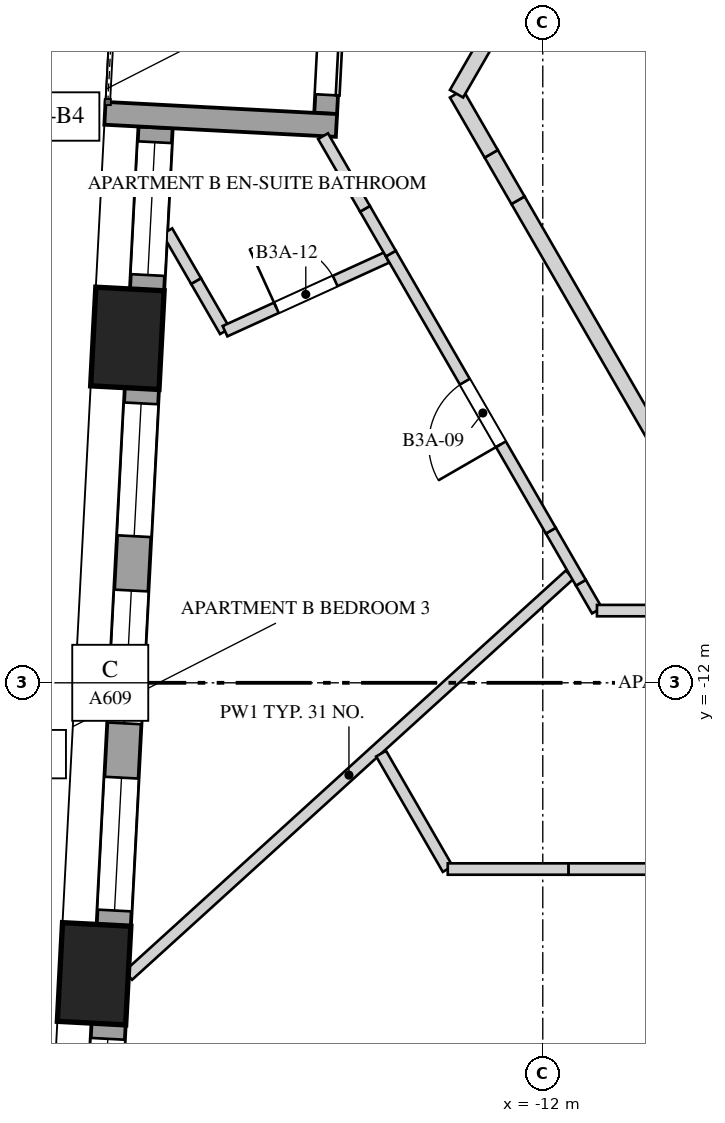
"""IFC4 building model, lengths in metres.
Left out: names, types, materials, properties, quantities, classifications, styles, units other than length and angle.
Written with IfcOpenShell. Run it as: python <this file> out.ifc"""

import sys

from ifc_helpers import new_model, si_unit, direction, frame, frame_2d, origin, origin_2d, place, context, subcontext, project, spatial, rectangle, extrude, element, fill, save


model = new_model("IFC4")
c1 = context("Model", 3, precision=1e-05, world=origin(), true_north=direction((0.0, 1.0)))
c2 = subcontext(c1, "Body", "Model", "MODEL_VIEW")
j1 = project(units=[si_unit("LENGTHUNIT", "METRE"), si_unit("PLANEANGLEUNIT", "RADIAN")], contexts=[c1])
p1 = place(None, origin())
s1 = spatial("IfcSite", under=j1, at=p1, CompositionType="ELEMENT")
p2 = place(p1, origin())
s2 = spatial("IfcBuilding", under=s1, at=p2, CompositionType="ELEMENT")
p3 = place(p2, frame((0.0, 0.0, 129.6)))
s3 = spatial("IfcBuildingStorey", under=s2, at=p3, CompositionType="ELEMENT", Elevation=129.6)
for number, where, z_axis, x_axis in (
    (1, (-17.465, -7.468, 0.0), (0.0, 0.0, 1.0), (-0.052, -0.999, 0.0)),
    (2, (-17.903, -15.828, 0.0), (0.0, 0.0, 1.0), (-0.052, -0.999, 0.0)),
):
    element("IfcColumn", number, at=place(p3, frame(where, z_axis=z_axis, x_axis=x_axis)), inside=s3, PredefinedType="COLUMN", context=c2, shape_type="SweptSolid", body=[
        extrude(rectangle(XDim=1.3, YDim=0.9, at=origin_2d()), origin(), (0.0, 0.0, 1.0), 4.0),
    ])
p4 = place(p3, frame((-17.094, -4.693, 0.0), z_axis=(0.0, 0.0, 1.0), x_axis=(-0.052355281723, -0.998628521762, 0.0)))
e3 = element("IfcWall", 3, at=p4, inside=s3, PredefinedType="SOLIDWALL", context=c2, shape_type="SweptSolid", body=[
    extrude(rectangle(XDim=2.14, YDim=0.45, at=frame_2d((1.07, 0.0))), origin(), (0.0, 0.0, 1.0), 3.3),
])
p5 = place(p4, frame((0.195, 0.0, 0.5)))
e4 = element("IfcOpeningElement", 4, at=p5, cuts=e3, PredefinedType="OPENING", context=c2, shape_type="SweptSolid", body=[
    extrude(rectangle(XDim=1.75, YDim=2.65, at=frame_2d((0.875, 1.325))), frame((0.0, 0.235, 0.0), z_axis=(0.0, -1.0, 0.0), x_axis=(1.0, 0.0, 0.0)), (0.0, 0.0, 1.0), 0.47),
])
p6 = place(p3, frame((-17.274, -8.129, 0.0), z_axis=(0.0, 0.0, 1.0), x_axis=(-0.052339570873, -0.998629345313, 0.0)))
e5 = element("IfcWall", 5, at=p6, inside=s3, PredefinedType="SOLIDWALL", context=c2, shape_type="SweptSolid", body=[
    extrude(rectangle(XDim=7.072, YDim=0.45, at=frame_2d((3.536, 0.0))), origin(), (0.0, 0.0, 1.0), 3.3),
])
p7 = place(p6, frame((0.195, 0.0, 0.5)))
e6 = element("IfcOpeningElement", 6, at=p7, cuts=e5, PredefinedType="OPENING", context=c2, shape_type="SweptSolid", body=[
    extrude(rectangle(XDim=1.75, YDim=2.65, at=frame_2d((0.875, 1.325))), frame((0.0, 0.235, 0.0), z_axis=(0.0, -1.0, 0.0), x_axis=(1.0, 0.0, 0.0)), (0.0, 0.0, 1.0), 0.47),
])
p8 = place(p6, frame((2.661, 0.0, 0.5)))
e7 = element("IfcOpeningElement", 7, at=p8, cuts=e5, PredefinedType="OPENING", context=c2, shape_type="SweptSolid", body=[
    extrude(rectangle(XDim=1.75, YDim=2.65, at=frame_2d((0.875, 1.325))), frame((0.0, 0.235, 0.0), z_axis=(0.0, -1.0, 0.0), x_axis=(1.0, 0.0, 0.0)), (0.0, 0.0, 1.0), 0.47),
])
p9 = place(p6, frame((5.126, 0.0, 0.5)))
e8 = element("IfcOpeningElement", 8, at=p9, cuts=e5, PredefinedType="OPENING", context=c2, shape_type="SweptSolid", body=[
    extrude(rectangle(XDim=1.75, YDim=2.0, at=frame_2d((0.875, 1.0))), frame((0.0, 0.235, 0.0), z_axis=(0.0, -1.0, 0.0), x_axis=(1.0, 0.0, 0.0)), (0.0, 0.0, 1.0), 0.47),
])
p10 = place(p3, frame((-17.712, -16.489, 0.0), z_axis=(0.0, 0.0, 1.0), x_axis=(-0.05234931875, -0.998628834366, 0.0)))
e9 = element("IfcWall", 9, at=p10, inside=s3, PredefinedType="SOLIDWALL", context=c2, shape_type="SweptSolid", body=[
    extrude(rectangle(XDim=2.141, YDim=0.45, at=frame_2d((1.07, 0.0))), origin(), (0.0, 0.0, 1.0), 3.3),
])
p11 = place(p10, frame((0.195, 0.0, 0.5)))
e10 = element("IfcOpeningElement", 10, at=p11, cuts=e9, PredefinedType="OPENING", context=c2, shape_type="SweptSolid", body=[
    extrude(rectangle(XDim=1.75, YDim=2.65, at=frame_2d((0.875, 1.325))), frame((0.0, 0.235, 0.0), z_axis=(0.0, -1.0, 0.0), x_axis=(1.0, 0.0, 0.0)), (0.0, 0.0, 1.0), 0.47),
])
p12 = place(p3, frame((-14.742, -2.322, 0.0), z_axis=(0.0, 0.0, 1.0), x_axis=(-0.052383338583, -0.998627050424, 0.0)))
e11 = element("IfcWall", 11, at=p12, inside=s3, PredefinedType="SOLIDWALL", context=c2, shape_type="SweptSolid", body=[
    extrude(rectangle(XDim=2.19, YDim=0.3, at=frame_2d((1.095, 0.0))), origin(), (0.0, 0.0, 1.0), 3.3),
])
p13 = place(p12, frame((0.245, 0.0, 0.0)))
e12 = element("IfcOpeningElement", 12, at=p13, cuts=e11, PredefinedType="OPENING", context=c2, shape_type="SweptSolid", body=[
    extrude(rectangle(XDim=1.7, YDim=2.45, at=frame_2d((0.85, 1.225))), frame((0.0, 0.16, 0.0), z_axis=(0.0, -1.0, 0.0), x_axis=(1.0, 0.0, 0.0)), (0.0, 0.0, 1.0), 0.32),
])
p14 = place(p3, frame((-17.76, -4.508, 0.0), z_axis=(0.0, 0.0, 1.0), x_axis=(0.998633044326, -0.052268946613, 0.0)))
e13 = element("IfcWall", 13, at=p14, inside=s3, PredefinedType="SOLIDWALL", context=c2, shape_type="SweptSolid", body=[
    extrude(rectangle(XDim=3.05, YDim=0.3, at=frame_2d((1.525, 0.0))), origin(), (0.0, 0.0, 1.0), 3.3),
])
p15 = place(p3, frame((-17.454, -15.851, 0.0), z_axis=(0.0, 0.0, 1.0), x_axis=(0.740276567096, 0.672302464824, 0.0)))
e14 = element("IfcWall", 14, at=p15, inside=s3, PredefinedType="PARTITIONING", context=c2, shape_type="SweptSolid", body=[
    extrude(rectangle(XDim=7.844, YDim=0.15, at=frame_2d((3.922, 0.0))), origin(), (0.0, 0.0, 1.0), 2.75),
])
p16 = place(p3, frame((-16.181, -7.374, 0.0), z_axis=(0.0, 0.0, 1.0), x_axis=(-0.499999897272, 0.866025463095, 0.0)))
e15 = element("IfcWall", 15, at=p16, inside=s3, PredefinedType="PARTITIONING", context=c2, shape_type="SweptSolid", body=[
    extrude(rectangle(XDim=0.762, YDim=0.15, at=frame_2d((0.381, 0.0))), origin(), (0.0, 0.0, 1.0), 2.95),
])
p17 = place(p3, frame((-16.562, -6.715, 0.0), z_axis=(0.0, 0.0, 1.0), x_axis=(-0.499917764341, 0.866072877359, 0.0)))
e16 = element("IfcWall", 16, at=p17, inside=s3, PredefinedType="PARTITIONING", context=c2, shape_type="SweptSolid", body=[
    extrude(rectangle(XDim=0.758, YDim=0.15, at=frame_2d((0.379, 0.0))), origin(), (0.0, 0.0, 1.0), 3.65),
])
p18 = place(p3, frame((-16.181, -7.374, 0.0), z_axis=(0.0, 0.0, 1.0), x_axis=(0.909943631366, 0.414731946848, 0.0)))
e17 = element("IfcWall", 17, at=p18, inside=s3, PredefinedType="PARTITIONING", context=c2, shape_type="SweptSolid", body=[
    extrude(rectangle(XDim=2.336, YDim=0.15, at=frame_2d((1.168, 0.0))), origin(), (0.0, 0.0, 1.0), 3.65),
])
p19 = place(p18, frame((0.743, 0.0, 0.0)))
e18 = element("IfcOpeningElement", 18, at=p19, cuts=e17, PredefinedType="OPENING", context=c2, shape_type="SweptSolid", body=[
    extrude(rectangle(XDim=0.85, YDim=2.4, at=frame_2d((0.425, 1.2))), frame((0.0, 0.085, 0.0), z_axis=(0.0, -1.0, 0.0), x_axis=(1.0, 0.0, 0.0)), (0.0, 0.0, 1.0), 0.17),
])
p20 = place(p3, frame((-13.25, -14.45, 0.0), z_axis=(0.0, 0.0, 1.0), x_axis=(-0.500047902311, 0.865997745606, 0.0)))
e19 = element("IfcWall", 19, at=p20, inside=s3, PredefinedType="PARTITIONING", context=c2, shape_type="SweptSolid", body=[
    extrude(rectangle(XDim=1.753, YDim=0.15, at=frame_2d((0.876, 0.0))), origin(), (0.0, 0.0, 1.0), 3.65),
])
p21 = place(p3, frame((-11.287, -11.05, 0.0), z_axis=(0.0, 0.0, 1.0), x_axis=(-0.499489419809, 0.866319986782, 0.0)))
e20 = element("IfcWall", 20, at=p21, inside=s3, PredefinedType="PARTITIONING", context=c2, shape_type="SweptSolid", body=[
    extrude(rectangle(XDim=0.423, YDim=0.15, at=frame_2d((0.212, 0.0))), origin(), (0.0, 0.0, 1.0), 3.65),
])
p22 = place(p3, frame((-11.499, -10.683, 0.0), z_axis=(0.0, 0.0, 1.0), x_axis=(-0.50012328804, 0.865954211699, 0.0)))
e21 = element("IfcWall", 21, at=p22, inside=s3, PredefinedType="PARTITIONING", context=c2, shape_type="SweptSolid", body=[
    extrude(rectangle(XDim=0.791, YDim=0.15, at=frame_2d((0.396, 0.0))), origin(), (0.0, 0.0, 1.0), 2.75),
])
p23 = place(p3, frame((-11.894, -9.999, 0.0), z_axis=(0.0, 0.0, 1.0), x_axis=(-0.500000251441, 0.866025258615, 0.0)))
e22 = element("IfcWall", 22, at=p23, inside=s3, PredefinedType="PARTITIONING", context=c2, shape_type="SweptSolid", body=[
    extrude(rectangle(XDim=4.209, YDim=0.15, at=frame_2d((2.105, 0.0))), origin(), (0.0, 0.0, 1.0), 3.65),
])
p24 = place(p23, frame((1.313, 0.0, 0.0)))
e23 = element("IfcOpeningElement", 23, at=p24, cuts=e22, PredefinedType="OPENING", context=c2, shape_type="SweptSolid", body=[
    extrude(rectangle(XDim=0.95, YDim=2.4, at=frame_2d((0.475, 1.2))), frame((0.0, 0.085, 0.0), z_axis=(0.0, -1.0, 0.0), x_axis=(1.0, 0.0, 0.0)), (0.0, 0.0, 1.0), 0.17),
])
p25 = place(p3, frame((-13.999, -6.353, 0.0), z_axis=(0.0, 0.0, 1.0), x_axis=(-0.499846793097, 0.866113839764, 0.0)))
e24 = element("IfcWall", 24, at=p25, inside=s3, PredefinedType="PARTITIONING", context=c2, shape_type="SweptSolid", body=[
    extrude(rectangle(XDim=0.68, YDim=0.15, at=frame_2d((0.34, 0.0))), origin(), (0.0, 0.0, 1.0), 2.95),
])
p26 = place(p3, frame((-14.339, -5.764, 0.0), z_axis=(0.0, 0.0, 1.0), x_axis=(-0.500111757231, 0.865960871102, 0.0)))
e25 = element("IfcWall", 25, at=p26, inside=s3, PredefinedType="PARTITIONING", context=c2, shape_type="SweptSolid", body=[
    extrude(rectangle(XDim=1.104, YDim=0.15, at=frame_2d((0.552, 0.0))), origin(), (0.0, 0.0, 1.0), 3.65),
])
p27 = place(p3, frame((-10.559, -14.45, 0.0), z_axis=(0.0, 0.0, 1.0), x_axis=(-1.0, 0.0, 0.0)))
e26 = element("IfcWall", 26, at=p27, inside=s3, PredefinedType="PARTITIONING", context=c2, shape_type="SweptSolid", body=[
    extrude(rectangle(XDim=1.104, YDim=0.15, at=frame_2d((0.552, 0.0))), origin(), (0.0, 0.0, 1.0), 2.55),
])
p28 = place(p3, frame((-11.663, -14.45, 0.0), z_axis=(0.0, 0.0, 1.0), x_axis=(-1.0, 0.0, 0.0)))
e27 = element("IfcWall", 27, at=p28, inside=s3, PredefinedType="PARTITIONING", context=c2, shape_type="SweptSolid", body=[
    extrude(rectangle(XDim=1.587, YDim=0.15, at=frame_2d((0.794, 0.0))), origin(), (0.0, 0.0, 1.0), 3.65),
])
p29 = place(p3, frame((-9.048, -11.05, 0.0), z_axis=(0.0, 0.0, 1.0), x_axis=(-1.0, 0.0, 0.0)))
e28 = element("IfcWall", 28, at=p29, inside=s3, PredefinedType="PARTITIONING", context=c2, shape_type="SweptSolid", body=[
    extrude(rectangle(XDim=2.239, YDim=0.15, at=frame_2d((1.119, 0.0))), origin(), (0.0, 0.0, 1.0), 3.65),
])
p30 = place(p3, frame((-10.525, -8.771, 0.0), z_axis=(0.0, 0.0, 1.0), x_axis=(-0.500031425827, 0.866007259314, 0.0)))
e29 = element("IfcWall", 29, at=p30, inside=s3, PredefinedType="SOLIDWALL", context=c2, shape_type="SweptSolid", body=[
    extrude(rectangle(XDim=3.602, YDim=0.2, at=frame_2d((1.801, 0.0))), origin(), (0.0, 0.0, 1.0), 3.65),
])
p31 = place(p3, frame((-12.326, -5.651, 0.0), z_axis=(0.0, 0.0, 1.0), x_axis=(-0.499752435038, 0.86616828831, 0.0)))
e30 = element("IfcWall", 30, at=p31, inside=s3, PredefinedType="SOLIDWALL", context=c2, shape_type="SweptSolid", body=[
    extrude(rectangle(XDim=0.705, YDim=0.2, at=frame_2d((0.353, 0.0))), origin(), (0.0, 0.0, 1.0), 2.95),
])
p32 = place(p3, frame((-12.678, -5.041, 0.0), z_axis=(0.0, 0.0, 1.0), x_axis=(-0.500108273885, 0.865962882802, 0.0)))
e31 = element("IfcWall", 31, at=p32, inside=s3, PredefinedType="SOLIDWALL", context=c2, shape_type="SweptSolid", body=[
    extrude(rectangle(XDim=0.913, YDim=0.2, at=frame_2d((0.457, 0.0))), origin(), (0.0, 0.0, 1.0), 3.65),
])
p33 = place(p3, frame((-13.135, -4.25, 0.0), z_axis=(0.0, 0.0, 1.0), x_axis=(0.50000466804, 0.866022708674, 0.0)))
e32 = element("IfcWall", 32, at=p33, inside=s3, PredefinedType="SOLIDWALL", context=c2, shape_type="SweptSolid", body=[
    extrude(rectangle(XDim=5.142, YDim=0.2, at=frame_2d((2.571, 0.0))), origin(), (0.0, 0.0, 1.0), 3.65),
])
p34 = place(p5, origin())
e33 = element("IfcWindow", 33, at=p34, inside=s3, PartitioningType="SINGLE_PANEL", PredefinedType="WINDOW", context=c2, shape_type="SweptSolid", body=[
    extrude(rectangle(XDim=1.75, YDim=2.65, at=frame_2d((0.875, 1.325))), frame((0.0, 0.03, 0.0), z_axis=(0.0, -1.0, 0.0), x_axis=(1.0, 0.0, 0.0)), (0.0, 0.0, 1.0), 0.06),
])
fill(e4, e33)
p35 = place(p7, origin())
e34 = element("IfcWindow", 34, at=p35, inside=s3, PartitioningType="SINGLE_PANEL", PredefinedType="WINDOW", context=c2, shape_type="SweptSolid", body=[
    extrude(rectangle(XDim=1.75, YDim=2.65, at=frame_2d((0.875, 1.325))), frame((0.0, 0.03, 0.0), z_axis=(0.0, -1.0, 0.0), x_axis=(1.0, 0.0, 0.0)), (0.0, 0.0, 1.0), 0.06),
])
fill(e6, e34)
p36 = place(p8, origin())
e35 = element("IfcWindow", 35, at=p36, inside=s3, PartitioningType="SINGLE_PANEL", PredefinedType="WINDOW", context=c2, shape_type="SweptSolid", body=[
    extrude(rectangle(XDim=1.75, YDim=2.65, at=frame_2d((0.875, 1.325))), frame((0.0, 0.03, 0.0), z_axis=(0.0, -1.0, 0.0), x_axis=(1.0, 0.0, 0.0)), (0.0, 0.0, 1.0), 0.06),
])
fill(e7, e35)
p37 = place(p9, origin())
e36 = element("IfcWindow", 36, at=p37, inside=s3, PartitioningType="SINGLE_PANEL", PredefinedType="WINDOW", context=c2, shape_type="SweptSolid", body=[
    extrude(rectangle(XDim=1.75, YDim=2.0, at=frame_2d((0.875, 1.0))), frame((0.0, 0.03, 0.0), z_axis=(0.0, -1.0, 0.0), x_axis=(1.0, 0.0, 0.0)), (0.0, 0.0, 1.0), 0.06),
])
fill(e8, e36)
p38 = place(p11, origin())
e37 = element("IfcWindow", 37, at=p38, inside=s3, PartitioningType="SINGLE_PANEL", PredefinedType="WINDOW", context=c2, shape_type="SweptSolid", body=[
    extrude(rectangle(XDim=1.75, YDim=2.65, at=frame_2d((0.875, 1.325))), frame((0.0, 0.03, 0.0), z_axis=(0.0, -1.0, 0.0), x_axis=(1.0, 0.0, 0.0)), (0.0, 0.0, 1.0), 0.06),
])
fill(e10, e37)
p39 = place(p13, origin())
e38 = element("IfcDoor", 38, at=p39, inside=s3, OperationType="SLIDING_TO_LEFT", PredefinedType="DOOR", context=c2, shape_type="SweptSolid", body=[
    extrude(rectangle(XDim=1.7, YDim=2.45, at=frame_2d((0.85, 1.225))), frame((0.0, 0.025, 0.0), z_axis=(0.0, -1.0, 0.0), x_axis=(1.0, 0.0, 0.0)), (0.0, 0.0, 1.0), 0.05),
])
fill(e12, e38)
p40 = place(p24, origin())
e39 = element("IfcDoor", 39, at=p40, inside=s3, OperationType="SINGLE_SWING_LEFT", PredefinedType="DOOR", context=c2, shape_type="SweptSolid", body=[
    extrude(rectangle(XDim=0.95, YDim=2.4, at=frame_2d((0.475, 1.2))), frame((0.0, 0.025, 0.0), z_axis=(0.0, -1.0, 0.0), x_axis=(1.0, 0.0, 0.0)), (0.0, 0.0, 1.0), 0.05),
])
fill(e23, e39)
p41 = place(p19, origin())
e40 = element("IfcDoor", 40, at=p41, inside=s3, OperationType="SINGLE_SWING_RIGHT", PredefinedType="DOOR", context=c2, shape_type="SweptSolid", body=[
    extrude(rectangle(XDim=0.85, YDim=2.4, at=frame_2d((0.425, 1.2))), frame((0.0, 0.025, 0.0), z_axis=(0.0, -1.0, 0.0), x_axis=(1.0, 0.0, 0.0)), (0.0, 0.0, 1.0), 0.05),
])
fill(e18, e40)
save(model, sys.argv[1])
